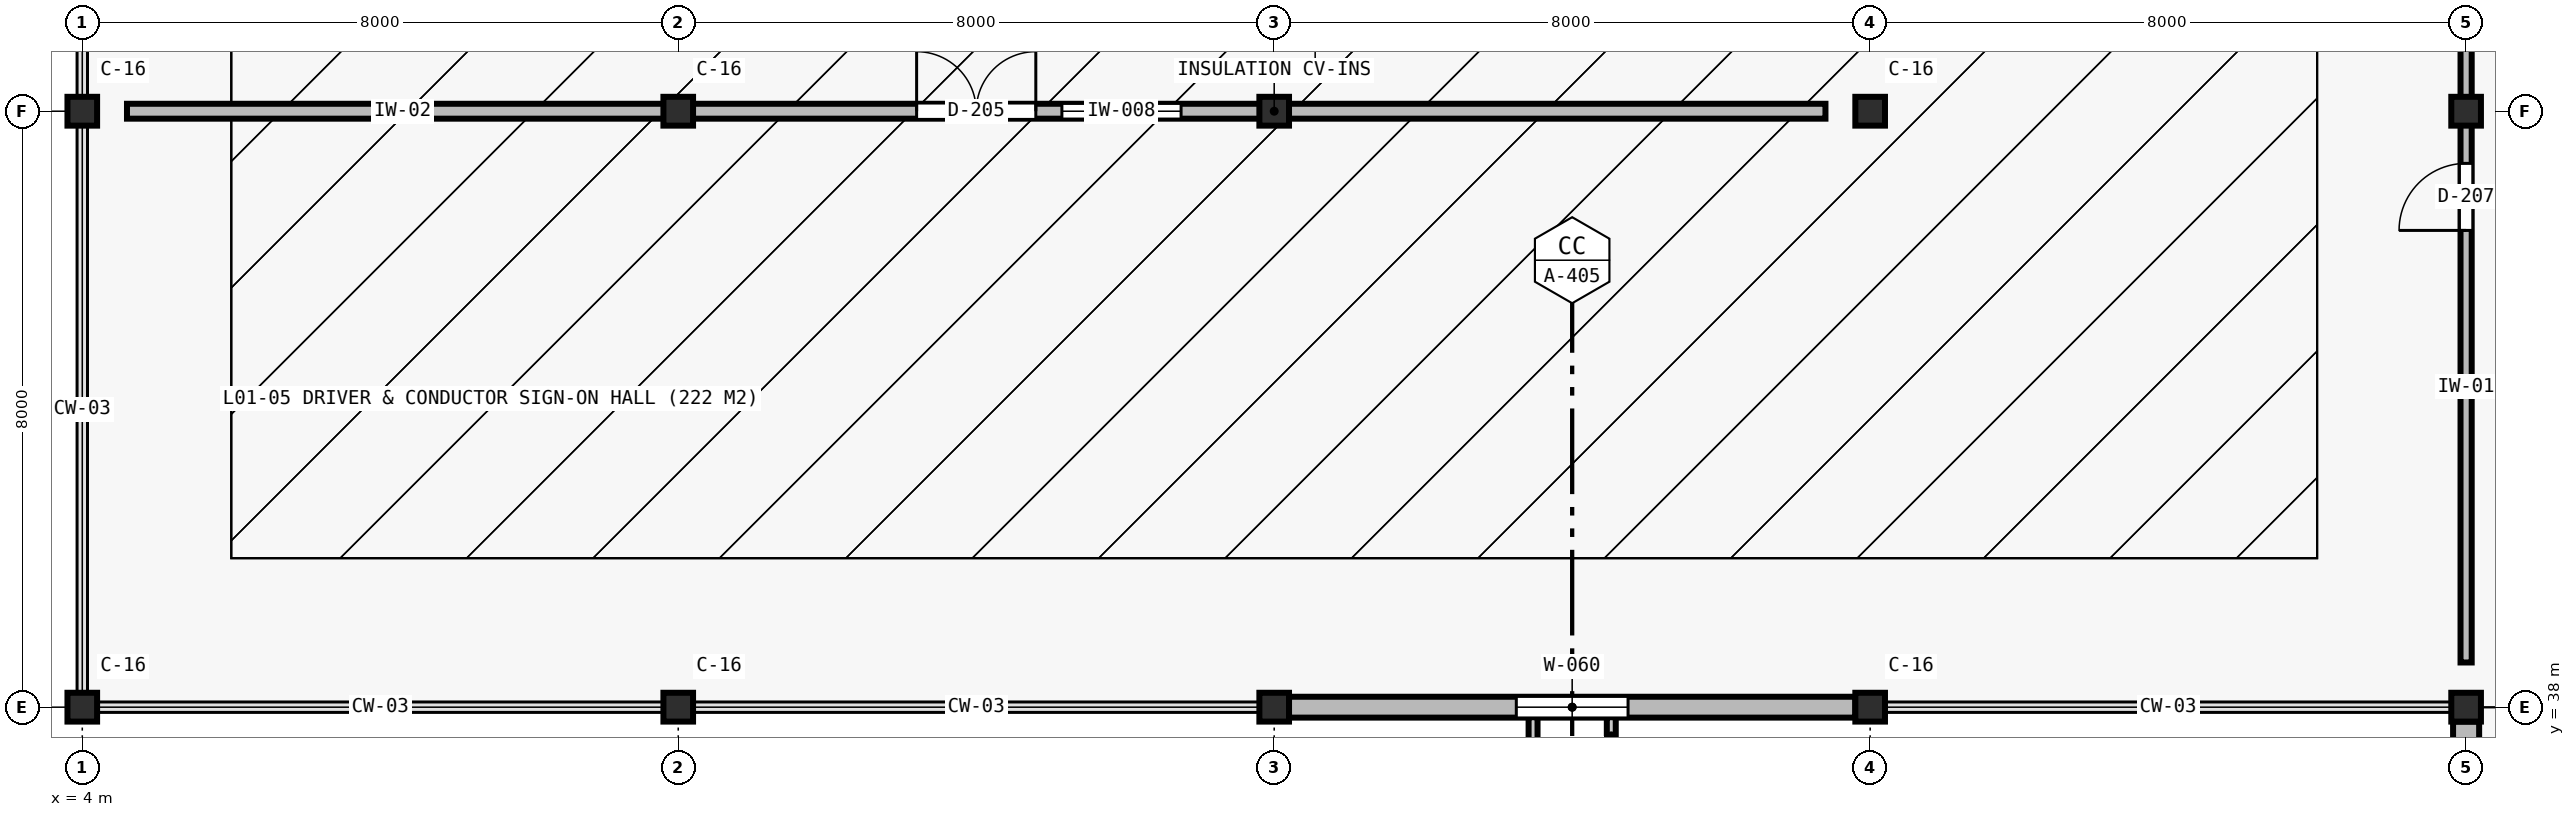
"""IFC4 building model, lengths in metres.
Left out: names, types, materials, properties, quantities, classifications, styles, units other than length and angle.
Written with IfcOpenShell. Run it as: python <this file> out.ifc"""

import sys

from ifc_helpers import new_model, si_unit, direction, frame, frame_2d, origin, origin_2d, place, context, subcontext, project, spatial, rectangle, i_section, extrude, element, fill, save


model = new_model("IFC4")
c1 = context("Model", 3, precision=1e-05, world=origin(), true_north=direction((0.0, 1.0)))
c2 = subcontext(c1, "Body", "Model", "MODEL_VIEW")
j1 = project(units=[si_unit("LENGTHUNIT", "METRE"), si_unit("PLANEANGLEUNIT", "RADIAN")], contexts=[c1])
p1 = place(None, origin())
s1 = spatial("IfcSite", under=j1, at=p1, CompositionType="ELEMENT")
p2 = place(p1, origin())
s2 = spatial("IfcBuilding", under=s1, at=p2, CompositionType="ELEMENT")
p3 = place(p2, frame((0.0, 0.0, 6.3)))
s3 = spatial("IfcBuildingStorey", under=s2, at=p3, CompositionType="ELEMENT", Elevation=6.3)
for number, where, z_axis, x_axis in (
    (1, (4.0, 38.0, 0.0), (0.0, 0.0, 1.0), (1.0, 0.0, 0.0)),
    (2, (4.0, 46.0, 0.0), (0.0, 0.0, 1.0), (1.0, 0.0, 0.0)),
    (3, (12.0, 38.0, 0.0), (0.0, 0.0, 1.0), (1.0, 0.0, 0.0)),
    (4, (12.0, 46.0, 0.0), (0.0, 0.0, 1.0), (1.0, 0.0, 0.0)),
    (5, (20.0, 38.0, 0.0), (0.0, 0.0, 1.0), (1.0, 0.0, 0.0)),
    (6, (20.0, 46.0, 0.0), (0.0, 0.0, 1.0), (1.0, 0.0, 0.0)),
    (7, (28.0, 38.0, 0.0), (0.0, 0.0, 1.0), (1.0, 0.0, 0.0)),
    (8, (28.0, 46.0, 0.0), (0.0, 0.0, 1.0), (1.0, 0.0, 0.0)),
    (9, (36.0, 38.0, 0.0), (0.0, 0.0, 1.0), (1.0, 0.0, 0.0)),
    (10, (36.0, 46.0, 0.0), (0.0, 0.0, 1.0), (1.0, 0.0, 0.0)),
):
    element("IfcColumn", number, at=place(p3, frame(where, z_axis=z_axis, x_axis=x_axis)), inside=s3, PredefinedType="COLUMN", context=c2, shape_type="SweptSolid", body=[
        extrude(i_section(OverallWidth=0.398, OverallDepth=0.387, WebThickness=0.021, FlangeThickness=0.033, at=origin_2d()), origin(), (0.0, 0.0, 1.0), 4.6),
    ])
p4 = place(p3, frame((36.0, 30.3, 0.0), z_axis=(0.0, 0.0, 1.0), x_axis=(0.0, 1.0, 0.0)))
e11 = element("IfcWall", 11, at=p4, inside=s3, PredefinedType="STANDARD", context=c2, shape_type="SweptSolid", body=[
    extrude(rectangle(XDim=7.506, YDim=0.35, at=frame_2d((3.753, 0.0))), origin(), (0.0, 0.0, 1.0), 4.6),
])
p5 = place(p4, frame((2.253, 0.0, 0.95)))
e12 = element("IfcOpeningElement", 12, at=p5, cuts=e11, PredefinedType="OPENING", context=c2, shape_type="SweptSolid", body=[
    extrude(rectangle(XDim=3.0, YDim=1.9, at=frame_2d((1.5, 0.95))), frame((0.0, 0.185, 0.0), z_axis=(0.0, -1.0, 0.0), x_axis=(1.0, 0.0, 0.0)), (0.0, 0.0, 1.0), 0.37),
])
p6 = place(p3, frame((27.801, 38.0, 0.0), z_axis=(0.0, 0.0, 1.0), x_axis=(-1.0, 0.0, 0.0)))
e13 = element("IfcWall", 13, at=p6, inside=s3, PredefinedType="STANDARD", context=c2, shape_type="SweptSolid", body=[
    extrude(rectangle(XDim=7.602, YDim=0.28, at=frame_2d((3.801, 0.0))), origin(), (0.0, 0.0, 1.0), 3.85),
])
p7 = place(p6, frame((3.051, 0.0, 0.95)))
e14 = element("IfcOpeningElement", 14, at=p7, cuts=e13, PredefinedType="OPENING", context=c2, shape_type="SweptSolid", body=[
    extrude(rectangle(XDim=1.5, YDim=2.0, at=frame_2d((0.75, 1.0))), frame((0.0, 0.15, 0.0), z_axis=(0.0, -1.0, 0.0), x_axis=(1.0, 0.0, 0.0)), (0.0, 0.0, 1.0), 0.3),
])
p8 = place(p3, frame((4.6, 46.0, 0.0), z_axis=(0.0, 0.0, 1.0), x_axis=(1.0, 0.0, 0.0)))
e15 = element("IfcWall", 15, at=p8, inside=s3, PredefinedType="PARTITIONING", context=c2, shape_type="SweptSolid", body=[
    extrude(rectangle(XDim=7.4, YDim=0.2, at=frame_2d((3.7, 0.0))), origin(), (0.0, 0.0, 1.0), 3.85),
])
p9 = place(p3, frame((36.0, 38.6, 0.0), z_axis=(0.0, 0.0, 1.0), x_axis=(0.0, 1.0, 0.0)))
e16 = element("IfcWall", 16, at=p9, inside=s3, PredefinedType="PARTITIONING", context=c2, shape_type="SweptSolid", body=[
    extrude(rectangle(XDim=7.4, YDim=0.15, at=frame_2d((3.7, 0.0))), origin(), (0.0, 0.0, 1.0), 3.85),
])
p10 = place(p9, frame((5.8, 0.0, 0.0)))
e17 = element("IfcOpeningElement", 17, at=p10, cuts=e16, PredefinedType="OPENING", context=c2, shape_type="SweptSolid", body=[
    extrude(rectangle(XDim=0.9, YDim=2.1, at=frame_2d((0.45, 1.05))), frame((0.0, 0.085, 0.0), z_axis=(0.0, -1.0, 0.0), x_axis=(1.0, 0.0, 0.0)), (0.0, 0.0, 1.0), 0.17),
])
p11 = place(p3, frame((12.0, 46.0, 0.0), z_axis=(0.0, 0.0, 1.0), x_axis=(1.0, 0.0, 0.0)))
e18 = element("IfcWall", 18, at=p11, inside=s3, PredefinedType="PARTITIONING", context=c2, shape_type="SweptSolid", body=[
    extrude(rectangle(XDim=15.4, YDim=0.2, at=frame_2d((7.7, 0.0))), origin(), (0.0, 0.0, 1.0), 3.988),
])
p12 = place(p11, frame((3.2, 0.0, 0.0)))
e19 = element("IfcOpeningElement", 19, at=p12, cuts=e18, PredefinedType="OPENING", context=c2, shape_type="SweptSolid", body=[
    extrude(rectangle(XDim=1.6, YDim=2.2, at=frame_2d((0.8, 1.1))), frame((0.0, 0.11, 0.0), z_axis=(0.0, -1.0, 0.0), x_axis=(1.0, 0.0, 0.0)), (0.0, 0.0, 1.0), 0.22),
])
p13 = place(p11, frame((5.15, 0.0, 0.95)))
e20 = element("IfcOpeningElement", 20, at=p13, cuts=e18, PredefinedType="OPENING", context=c2, shape_type="SweptSolid", body=[
    extrude(rectangle(XDim=1.6, YDim=1.3, at=frame_2d((0.8, 0.65))), frame((0.0, 0.11, 0.0), z_axis=(0.0, -1.0, 0.0), x_axis=(1.0, 0.0, 0.0)), (0.0, 0.0, 1.0), 0.22),
])
p14 = place(p3, frame((36.0, 46.0, 0.0), z_axis=(0.0, 0.0, 1.0), x_axis=(0.0, 1.0, 0.0)))
e21 = element("IfcWall", 21, at=p14, inside=s3, PredefinedType="PARTITIONING", context=c2, shape_type="SweptSolid", body=[
    extrude(rectangle(XDim=7.4, YDim=0.15, at=frame_2d((3.7, 0.0))), origin(), (0.0, 0.0, 1.0), 4.056),
])
p15 = place(p7, origin())
e22 = element("IfcWindow", 22, at=p15, inside=s3, PartitioningType="SINGLE_PANEL", PredefinedType="WINDOW", context=c2, shape_type="SweptSolid", body=[
    extrude(rectangle(XDim=1.5, YDim=2.0, at=frame_2d((0.75, 1.0))), frame((0.0, 0.03, 0.0), z_axis=(0.0, -1.0, 0.0), x_axis=(1.0, 0.0, 0.0)), (0.0, 0.0, 1.0), 0.06),
])
fill(e14, e22)
p16 = place(p12, origin())
e23 = element("IfcDoor", 23, at=p16, inside=s3, OperationType="DOUBLE_DOOR_SINGLE_SWING", PredefinedType="DOOR", context=c2, shape_type="SweptSolid", body=[
    extrude(rectangle(XDim=1.6, YDim=2.2, at=frame_2d((0.8, 1.1))), frame((0.0, 0.025, 0.0), z_axis=(0.0, -1.0, 0.0), x_axis=(1.0, 0.0, 0.0)), (0.0, 0.0, 1.0), 0.05),
])
fill(e19, e23)
p17 = place(p13, origin())
e24 = element("IfcWindow", 24, at=p17, inside=s3, PartitioningType="SINGLE_PANEL", PredefinedType="WINDOW", context=c2, shape_type="SweptSolid", body=[
    extrude(rectangle(XDim=1.6, YDim=1.3, at=frame_2d((0.8, 0.65))), frame((0.0, 0.03, 0.0), z_axis=(0.0, -1.0, 0.0), x_axis=(1.0, 0.0, 0.0)), (0.0, 0.0, 1.0), 0.06),
])
fill(e20, e24)
p18 = place(p10, origin())
e25 = element("IfcDoor", 25, at=p18, inside=s3, OperationType="SINGLE_SWING_LEFT", PredefinedType="DOOR", context=c2, shape_type="SweptSolid", body=[
    extrude(rectangle(XDim=0.9, YDim=2.1, at=frame_2d((0.45, 1.05))), frame((0.0, 0.025, 0.0), z_axis=(0.0, -1.0, 0.0), x_axis=(1.0, 0.0, 0.0)), (0.0, 0.0, 1.0), 0.05),
])
fill(e17, e25)
save(model, sys.argv[1])
